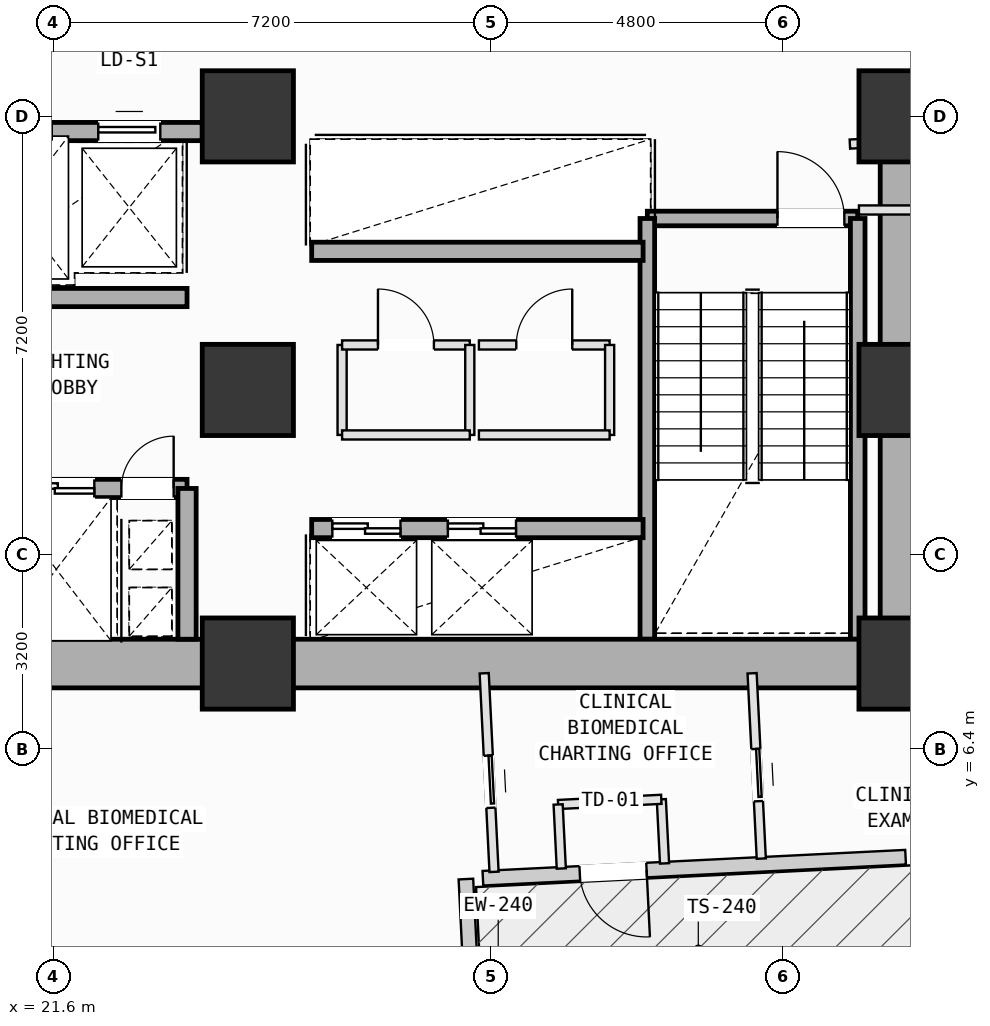
"""IFC4 building model, lengths in metres.
Left out: names, types, materials, properties, quantities, classifications, styles, units other than length and angle.
Written with IfcOpenShell. Run it as: python <this file> out.ifc"""

import sys

from ifc_helpers import new_model, si_unit, direction, frame, frame_2d, origin, origin_2d, place, context, subcontext, project, spatial, rectangle, extrude, element, fill, save


model = new_model("IFC4")
c1 = context("Model", 3, precision=1e-05, world=origin(), true_north=direction((0.0, 1.0)))
c2 = subcontext(c1, "Body", "Model", "MODEL_VIEW")
j1 = project(units=[si_unit("LENGTHUNIT", "METRE"), si_unit("PLANEANGLEUNIT", "RADIAN")], contexts=[c1])
p1 = place(None, origin())
s1 = spatial("IfcSite", under=j1, at=p1, CompositionType="ELEMENT")
p2 = place(p1, origin())
s2 = spatial("IfcBuilding", under=s1, at=p2, CompositionType="ELEMENT")
p3 = place(p2, frame((0.0, 0.0, 35.0)))
s3 = spatial("IfcBuildingStorey", under=s2, at=p3, CompositionType="ELEMENT", Elevation=35.0)
for number, where, z_axis, x_axis in (
    (1, (24.8, 7.8, 0.0), (0.0, 0.0, 1.0), (1.0, 0.0, 0.0)),
    (2, (24.8, 12.3, 0.0), (0.0, 0.0, 1.0), (1.0, 0.0, 0.0)),
    (3, (24.8, 16.8, 0.0), (0.0, 0.0, 1.0), (1.0, 0.0, 0.0)),
    (4, (35.6, 7.8, 0.0), (0.0, 0.0, 1.0), (1.0, 0.0, 0.0)),
    (5, (35.6, 12.3, 0.0), (0.0, 0.0, 1.0), (1.0, 0.0, 0.0)),
    (6, (35.6, 16.8, 0.0), (0.0, 0.0, 1.0), (1.0, 0.0, 0.0)),
):
    element("IfcColumn", number, at=place(p3, frame(where, z_axis=z_axis, x_axis=x_axis)), inside=s3, PredefinedType="COLUMN", context=c2, shape_type="SweptSolid", body=[
        extrude(rectangle(XDim=1.5, YDim=1.5, at=origin_2d()), origin(), (0.0, 0.0, 1.0), 4.0),
    ])
p4 = place(p3, frame((31.91, 2.438, 0.002), z_axis=(0.092332687051, -0.006204172648, 0.995708884737), x_axis=(0.017562948544, 0.999835172037, 0.004601260333)))
e7 = element("IfcColumn", 7, at=p4, inside=s3, PredefinedType="COLUMN", context=c2, shape_type="SweptSolid", body=[
    extrude(rectangle(XDim=1.6, YDim=0.9, at=origin_2d()), origin(), (0.0, 0.0, 1.0), 4.014),
])
p5 = place(p3, frame((35.617, 4.615, 0.0), z_axis=(0.0, 0.0, 1.0), x_axis=(-0.998763945983, -0.04970493139, 0.0)))
e8 = element("IfcWall", 8, at=p5, inside=s3, PredefinedType="SOLIDWALL", context=c2, shape_type="SweptSolid", body=[
    extrude(rectangle(XDim=6.96, YDim=0.24, at=frame_2d((3.48, 0.0))), origin(), (0.0, 0.0, 1.0), 3.165),
])
p6 = place(p5, frame((4.264, 0.0, 0.0)))
e9 = element("IfcOpeningElement", 9, at=p6, cuts=e8, PredefinedType="OPENING", context=c2, shape_type="SweptSolid", body=[
    extrude(rectangle(XDim=1.1, YDim=2.15, at=frame_2d((0.55, 1.075))), frame((0.0, 0.13, 0.0), z_axis=(0.0, -1.0, 0.0), x_axis=(1.0, 0.0, 0.0)), (0.0, 0.0, 1.0), 0.26),
])
p7 = place(p3, frame((28.386, 4.255, 0.0), z_axis=(0.0, 0.0, 1.0), x_axis=(0.049801248091, -0.998759147987, 0.0)))
e10 = element("IfcWall", 10, at=p7, inside=s3, PredefinedType="SOLIDWALL", context=c2, shape_type="SweptSolid", body=[
    extrude(rectangle(XDim=2.5, YDim=0.24, at=frame_2d((1.25, 0.0))), origin(), (0.0, 0.0, 1.0), 3.165),
])
p8 = place(p3, frame((31.37, 15.12, 0.0), z_axis=(0.0, 0.0, 1.0), x_axis=(1.0, 0.0, 0.0)))
e11 = element("IfcWall", 11, at=p8, inside=s3, PredefinedType="SOLIDWALL", context=c2, shape_type="SweptSolid", body=[
    extrude(rectangle(XDim=3.46, YDim=0.24, at=frame_2d((1.73, 0.0))), origin(), (0.0, 0.0, 1.0), 3.78),
])
p9 = place(p8, frame((2.14, 0.0, 0.0)))
e12 = element("IfcOpeningElement", 12, at=p9, cuts=e11, PredefinedType="OPENING", context=c2, shape_type="SweptSolid", body=[
    extrude(rectangle(XDim=1.1, YDim=2.15, at=frame_2d((0.55, 1.075))), frame((0.0, 0.13, 0.0), z_axis=(0.0, -1.0, 0.0), x_axis=(1.0, 0.0, 0.0)), (0.0, 0.0, 1.0), 0.26),
])
for number, where, z_axis, x_axis in (
    (13, (34.83, 15.12, 0.0), (0.0, 0.0, 1.0), (0.0, -1.0, 0.0)),
    (14, (31.37, 8.2, 0.0), (0.0, 0.0, 1.0), (0.0, 1.0, 0.0)),
):
    element("IfcWall", number, at=place(p3, frame(where, z_axis=z_axis, x_axis=x_axis)), inside=s3, PredefinedType="SOLIDWALL", context=c2, shape_type="SweptSolid", body=[
        extrude(rectangle(XDim=6.92, YDim=0.24, at=frame_2d((3.46, 0.0))), origin(), (0.0, 0.0, 1.0), 3.78),
    ])
for number, where, z_axis, x_axis in (
    (15, (14.0, 7.8, 0.0), (0.0, 0.0, 1.0), (1.0, 0.0, 0.0)),
    (16, (24.8, 7.8, 0.0), (0.0, 0.0, 1.0), (1.0, 0.0, 0.0)),
):
    element("IfcWall", number, at=place(p3, frame(where, z_axis=z_axis, x_axis=x_axis)), inside=s3, PredefinedType="SHEAR", context=c2, shape_type="SweptSolid", body=[
        extrude(rectangle(XDim=10.8, YDim=0.8, at=frame_2d((5.4, 0.0))), origin(), (0.0, 0.0, 1.0), 3.78),
    ])
p10 = place(p3, frame((35.6, 7.8, 0.0), z_axis=(0.0, 0.0, 1.0), x_axis=(0.0, 1.0, 0.0)))
e17 = element("IfcWall", 17, at=p10, inside=s3, PredefinedType="SHEAR", context=c2, shape_type="SweptSolid", body=[
    extrude(rectangle(XDim=9.0, YDim=0.8, at=frame_2d((4.5, 0.0))), origin(), (0.0, 0.0, 1.0), 3.78),
])
p11 = place(p3, frame((19.85, 16.55, 0.0), z_axis=(0.0, 0.0, 1.0), x_axis=(1.0, 0.0, 0.0)))
e18 = element("IfcWall", 18, at=p11, inside=s3, PredefinedType="SOLIDWALL", context=c2, shape_type="SweptSolid", body=[
    extrude(rectangle(XDim=4.2, YDim=0.3, at=frame_2d((2.1, 0.0))), origin(), (0.0, 0.0, 1.0), 3.78),
])
p12 = place(p11, frame((0.475, 0.0, 0.0)))
e19 = element("IfcOpeningElement", 19, at=p12, cuts=e18, PredefinedType="OPENING", context=c2, shape_type="SweptSolid", body=[
    extrude(rectangle(XDim=1.25, YDim=2.18, at=frame_2d((0.625, 1.09))), frame((0.0, 0.16, 0.0), z_axis=(0.0, -1.0, 0.0), x_axis=(1.0, 0.0, 0.0)), (0.0, 0.0, 1.0), 0.32),
])
p13 = place(p11, frame((2.49, 0.0, 0.0)))
e20 = element("IfcOpeningElement", 20, at=p13, cuts=e18, PredefinedType="OPENING", context=c2, shape_type="SweptSolid", body=[
    extrude(rectangle(XDim=1.02, YDim=2.12, at=frame_2d((0.51, 1.06))), frame((0.0, 0.16, 0.0), z_axis=(0.0, -1.0, 0.0), x_axis=(1.0, 0.0, 0.0)), (0.0, 0.0, 1.0), 0.32),
])
p14 = place(p3, frame((18.5, 10.68, 0.0), z_axis=(0.0, 0.0, 1.0), x_axis=(1.0, 0.0, 0.0)))
e21 = element("IfcWall", 21, at=p14, inside=s3, PredefinedType="SOLIDWALL", context=c2, shape_type="SweptSolid", body=[
    extrude(rectangle(XDim=5.3, YDim=0.3, at=frame_2d((2.65, 0.0))), origin(), (0.0, 0.0, 1.0), 3.78),
])
p15 = place(p14, frame((4.22, 0.0, 0.0)))
e22 = element("IfcOpeningElement", 22, at=p15, cuts=e21, PredefinedType="OPENING", context=c2, shape_type="SweptSolid", body=[
    extrude(rectangle(XDim=0.86, YDim=2.06, at=frame_2d((0.43, 1.03))), frame((0.0, 0.16, 0.0), z_axis=(0.0, -1.0, 0.0), x_axis=(1.0, 0.0, 0.0)), (0.0, 0.0, 1.0), 0.32),
])
p16 = place(p14, frame((0.425, 0.0, 0.0)))
e23 = element("IfcOpeningElement", 23, at=p16, cuts=e21, PredefinedType="OPENING", context=c2, shape_type="SweptSolid", body=[
    extrude(rectangle(XDim=1.25, YDim=2.18, at=frame_2d((0.625, 1.09))), frame((0.0, 0.16, 0.0), z_axis=(0.0, -1.0, 0.0), x_axis=(1.0, 0.0, 0.0)), (0.0, 0.0, 1.0), 0.32),
])
p17 = place(p14, frame((2.525, 0.0, 0.0)))
e24 = element("IfcOpeningElement", 24, at=p17, cuts=e21, PredefinedType="OPENING", context=c2, shape_type="SweptSolid", body=[
    extrude(rectangle(XDim=1.25, YDim=2.18, at=frame_2d((0.625, 1.09))), frame((0.0, 0.16, 0.0), z_axis=(0.0, -1.0, 0.0), x_axis=(1.0, 0.0, 0.0)), (0.0, 0.0, 1.0), 0.32),
])
p18 = place(p3, frame((18.5, 13.82, 0.0), z_axis=(0.0, 0.0, 1.0), x_axis=(1.0, 0.0, 0.0)))
e25 = element("IfcWall", 25, at=p18, inside=s3, PredefinedType="SOLIDWALL", context=c2, shape_type="SweptSolid", body=[
    extrude(rectangle(XDim=5.3, YDim=0.3, at=frame_2d((2.65, 0.0))), origin(), (0.0, 0.0, 1.0), 3.78),
])
p19 = place(p18, frame((0.18, 0.0, 0.0)))
e26 = element("IfcOpeningElement", 26, at=p19, cuts=e25, PredefinedType="OPENING", context=c2, shape_type="SweptSolid", body=[
    extrude(rectangle(XDim=1.1, YDim=2.15, at=frame_2d((0.55, 1.075))), frame((0.0, 0.16, 0.0), z_axis=(0.0, -1.0, 0.0), x_axis=(1.0, 0.0, 0.0)), (0.0, 0.0, 1.0), 0.32),
])
p20 = place(p3, frame((23.8, 8.2, 0.0), z_axis=(0.0, 0.0, 1.0), x_axis=(0.0, 1.0, 0.0)))
e27 = element("IfcWall", 27, at=p20, inside=s3, PredefinedType="SOLIDWALL", context=c2, shape_type="SweptSolid", body=[
    extrude(rectangle(XDim=2.48, YDim=0.3, at=frame_2d((1.24, 0.0))), origin(), (0.0, 0.0, 1.0), 3.78),
])
p21 = place(p3, frame((25.85, 10.02, 0.0), z_axis=(0.0, 0.0, 1.0), x_axis=(1.0, 0.0, 0.0)))
e28 = element("IfcWall", 28, at=p21, inside=s3, PredefinedType="SOLIDWALL", context=c2, shape_type="SweptSolid", body=[
    extrude(rectangle(XDim=5.45, YDim=0.3, at=frame_2d((2.725, 0.0))), origin(), (0.0, 0.0, 1.0), 3.78),
])
p22 = place(p21, frame((0.34, 0.0, 0.0)))
e29 = element("IfcOpeningElement", 29, at=p22, cuts=e28, PredefinedType="OPENING", context=c2, shape_type="SweptSolid", body=[
    extrude(rectangle(XDim=1.12, YDim=2.15, at=frame_2d((0.56, 1.075))), frame((0.0, 0.16, 0.0), z_axis=(0.0, -1.0, 0.0), x_axis=(1.0, 0.0, 0.0)), (0.0, 0.0, 1.0), 0.32),
])
p23 = place(p21, frame((2.24, 0.0, 0.0)))
e30 = element("IfcOpeningElement", 30, at=p23, cuts=e28, PredefinedType="OPENING", context=c2, shape_type="SweptSolid", body=[
    extrude(rectangle(XDim=1.12, YDim=2.15, at=frame_2d((0.56, 1.075))), frame((0.0, 0.16, 0.0), z_axis=(0.0, -1.0, 0.0), x_axis=(1.0, 0.0, 0.0)), (0.0, 0.0, 1.0), 0.32),
])
p24 = place(p3, frame((25.85, 14.58, 0.0), z_axis=(0.0, 0.0, 1.0), x_axis=(1.0, 0.0, 0.0)))
e31 = element("IfcWall", 31, at=p24, inside=s3, PredefinedType="SOLIDWALL", context=c2, shape_type="SweptSolid", body=[
    extrude(rectangle(XDim=5.45, YDim=0.3, at=frame_2d((2.725, 0.0))), origin(), (0.0, 0.0, 1.0), 3.78),
])
p25 = place(p3, frame((26.35, 11.56, 0.0), z_axis=(0.0, 0.0, 1.0), x_axis=(0.0, 1.0, 0.0)))
e32 = element("IfcWall", 32, at=p25, inside=s3, PredefinedType="PARTITIONING", context=c2, shape_type="SweptSolid", body=[
    extrude(rectangle(XDim=1.48, YDim=0.15, at=frame_2d((0.74, 0.0))), origin(), (0.0, 0.0, 1.0), 3.78),
])
p26 = place(p3, frame((26.35, 13.04, 0.0), z_axis=(0.0, 0.0, 1.0), x_axis=(1.0, 0.0, 0.0)))
e33 = element("IfcWall", 33, at=p26, inside=s3, PredefinedType="PARTITIONING", context=c2, shape_type="SweptSolid", body=[
    extrude(rectangle(XDim=2.1, YDim=0.15, at=frame_2d((1.05, 0.0))), origin(), (0.0, 0.0, 1.0), 3.78),
])
p27 = place(p26, frame((0.59, 0.0, 0.0)))
e34 = element("IfcOpeningElement", 34, at=p27, cuts=e33, PredefinedType="OPENING", context=c2, shape_type="SweptSolid", body=[
    extrude(rectangle(XDim=0.92, YDim=2.1, at=frame_2d((0.46, 1.05))), frame((0.0, 0.085, 0.0), z_axis=(0.0, -1.0, 0.0), x_axis=(1.0, 0.0, 0.0)), (0.0, 0.0, 1.0), 0.17),
])
p28 = place(p3, frame((28.45, 13.04, 0.0), z_axis=(0.0, 0.0, 1.0), x_axis=(0.0, -1.0, 0.0)))
e35 = element("IfcWall", 35, at=p28, inside=s3, PredefinedType="PARTITIONING", context=c2, shape_type="SweptSolid", body=[
    extrude(rectangle(XDim=1.48, YDim=0.15, at=frame_2d((0.74, 0.0))), origin(), (0.0, 0.0, 1.0), 3.78),
])
p29 = place(p3, frame((28.45, 11.56, 0.0), z_axis=(0.0, 0.0, 1.0), x_axis=(-1.0, 0.0, 0.0)))
e36 = element("IfcWall", 36, at=p29, inside=s3, PredefinedType="PARTITIONING", context=c2, shape_type="SweptSolid", body=[
    extrude(rectangle(XDim=2.1, YDim=0.15, at=frame_2d((1.05, 0.0))), origin(), (0.0, 0.0, 1.0), 3.78),
])
p30 = place(p3, frame((28.6, 13.04, 0.0), z_axis=(0.0, 0.0, 1.0), x_axis=(1.0, 0.0, 0.0)))
e37 = element("IfcWall", 37, at=p30, inside=s3, PredefinedType="PARTITIONING", context=c2, shape_type="SweptSolid", body=[
    extrude(rectangle(XDim=2.15, YDim=0.15, at=frame_2d((1.075, 0.0))), origin(), (0.0, 0.0, 1.0), 3.78),
])
p31 = place(p30, frame((0.615, 0.0, 0.0)))
e38 = element("IfcOpeningElement", 38, at=p31, cuts=e37, PredefinedType="OPENING", context=c2, shape_type="SweptSolid", body=[
    extrude(rectangle(XDim=0.92, YDim=2.1, at=frame_2d((0.46, 1.05))), frame((0.0, 0.085, 0.0), z_axis=(0.0, -1.0, 0.0), x_axis=(1.0, 0.0, 0.0)), (0.0, 0.0, 1.0), 0.17),
])
p32 = place(p3, frame((30.75, 13.04, 0.0), z_axis=(0.0, 0.0, 1.0), x_axis=(0.0, -1.0, 0.0)))
e39 = element("IfcWall", 39, at=p32, inside=s3, PredefinedType="PARTITIONING", context=c2, shape_type="SweptSolid", body=[
    extrude(rectangle(XDim=1.48, YDim=0.15, at=frame_2d((0.74, 0.0))), origin(), (0.0, 0.0, 1.0), 3.78),
])
p33 = place(p3, frame((30.75, 11.56, 0.0), z_axis=(0.0, 0.0, 1.0), x_axis=(-1.0, 0.0, 0.0)))
e40 = element("IfcWall", 40, at=p33, inside=s3, PredefinedType="PARTITIONING", context=c2, shape_type="SweptSolid", body=[
    extrude(rectangle(XDim=2.15, YDim=0.15, at=frame_2d((1.075, 0.0))), origin(), (0.0, 0.0, 1.0), 3.78),
])
p34 = place(p3, frame((28.687, 7.64, 0.0), z_axis=(0.0, 0.0, 1.0), x_axis=(0.049576399936, -0.998770334246, 0.0)))
e41 = element("IfcWall", 41, at=p34, inside=s3, PredefinedType="PARTITIONING", context=c2, shape_type="SweptSolid", body=[
    extrude(rectangle(XDim=3.27, YDim=0.15, at=frame_2d((1.635, 0.0))), origin(), (0.0, 0.0, 1.0), 3.78),
])
p35 = place(p34, frame((1.355, 0.0, 0.0)))
e42 = element("IfcOpeningElement", 42, at=p35, cuts=e41, PredefinedType="OPENING", context=c2, shape_type="SweptSolid", body=[
    extrude(rectangle(XDim=0.86, YDim=2.06, at=frame_2d((0.43, 1.03))), frame((0.0, 0.085, 0.0), z_axis=(0.0, -1.0, 0.0), x_axis=(1.0, 0.0, 0.0)), (0.0, 0.0, 1.0), 0.17),
])
p36 = place(p3, frame((33.093, 7.64, 0.0), z_axis=(0.0, 0.0, 1.0), x_axis=(0.049442819508, -0.998776955881, 0.0)))
e43 = element("IfcWall", 43, at=p36, inside=s3, PredefinedType="PARTITIONING", context=c2, shape_type="SweptSolid", body=[
    extrude(rectangle(XDim=3.052, YDim=0.15, at=frame_2d((1.526, 0.0))), origin(), (0.0, 0.0, 1.0), 3.78),
])
p37 = place(p36, frame((1.246, 0.0, 0.0)))
e44 = element("IfcOpeningElement", 44, at=p37, cuts=e43, PredefinedType="OPENING", context=c2, shape_type="SweptSolid", body=[
    extrude(rectangle(XDim=0.86, YDim=2.06, at=frame_2d((0.43, 1.03))), frame((0.0, 0.085, 0.0), z_axis=(0.0, -1.0, 0.0), x_axis=(1.0, 0.0, 0.0)), (0.0, 0.0, 1.0), 0.17),
])
p38 = place(p3, frame((31.653, 4.513, 0.0), z_axis=(0.0, 0.0, 1.0), x_axis=(-0.050203004496, 0.998739034152, 0.0)))
e45 = element("IfcWall", 45, at=p38, inside=s3, PredefinedType="PARTITIONING", context=c2, shape_type="SweptSolid", body=[
    extrude(rectangle(XDim=1.055, YDim=0.15, at=frame_2d((0.528, 0.0))), origin(), (0.0, 0.0, 1.0), 3.78),
])
p39 = place(p3, frame((31.6, 5.567, 0.0), z_axis=(0.0, 0.0, 1.0), x_axis=(-0.998749111962, -0.050002113503, 0.0)))
e46 = element("IfcWall", 46, at=p39, inside=s3, PredefinedType="PARTITIONING", context=c2, shape_type="SweptSolid", body=[
    extrude(rectangle(XDim=1.699, YDim=0.15, at=frame_2d((0.85, 0.0))), origin(), (0.0, 0.0, 1.0), 3.78),
])
p40 = place(p3, frame((29.903, 5.482, 0.0), z_axis=(0.0, 0.0, 1.0), x_axis=(0.049325464305, -0.998782758447, 0.0)))
e47 = element("IfcWall", 47, at=p40, inside=s3, PredefinedType="PARTITIONING", context=c2, shape_type="SweptSolid", body=[
    extrude(rectangle(XDim=1.054, YDim=0.15, at=frame_2d((0.527, 0.0))), origin(), (0.0, 0.0, 1.0), 3.78),
])
p41 = place(p3, frame((35.6, 7.5, 0.0), z_axis=(0.0, 0.0, 1.0), x_axis=(1.0, 0.0, 0.0)))
e48 = element("IfcWall", 48, at=p41, inside=s3, PredefinedType="PARTITIONING", context=c2, shape_type="SweptSolid", body=[
    extrude(rectangle(XDim=0.55, YDim=0.15, at=frame_2d((0.275, 0.0))), origin(), (0.0, 0.0, 1.0), 2.865),
])
p42 = place(p3, frame((36.15, 15.26, 0.0), z_axis=(0.0, 0.0, 1.0), x_axis=(-1.0, 0.0, 0.0)))
e49 = element("IfcWall", 49, at=p42, inside=s3, PredefinedType="PARTITIONING", context=c2, shape_type="SweptSolid", body=[
    extrude(rectangle(XDim=1.3, YDim=0.15, at=frame_2d((0.65, 0.0))), origin(), (0.0, 0.0, 1.0), 3.78),
])
p43 = place(p3, frame((34.701, 16.344, 0.0), z_axis=(0.0, 0.0, 1.0), x_axis=(0.998749368523, 0.049996988651, 0.0)))
e50 = element("IfcWall", 50, at=p43, inside=s3, PredefinedType="PARTITIONING", context=c2, shape_type="SweptSolid", body=[
    extrude(rectangle(XDim=2.461, YDim=0.15, at=frame_2d((1.23, 0.0))), origin(), (0.0, 0.0, 1.0), 2.865),
])
p44 = place(p6, origin())
e51 = element("IfcDoor", 51, at=p44, inside=s3, OperationType="SINGLE_SWING_LEFT", PredefinedType="DOOR", context=c2, shape_type="SweptSolid", body=[
    extrude(rectangle(XDim=1.1, YDim=2.15, at=frame_2d((0.55, 1.075))), frame((0.0, 0.025, 0.0), z_axis=(0.0, -1.0, 0.0), x_axis=(1.0, 0.0, 0.0)), (0.0, 0.0, 1.0), 0.05),
])
fill(e9, e51)
p45 = place(p9, origin())
e52 = element("IfcDoor", 52, at=p45, inside=s3, OperationType="SINGLE_SWING_LEFT", PredefinedType="DOOR", context=c2, shape_type="SweptSolid", body=[
    extrude(rectangle(XDim=1.1, YDim=2.15, at=frame_2d((0.55, 1.075))), frame((0.0, 0.025, 0.0), z_axis=(0.0, -1.0, 0.0), x_axis=(1.0, 0.0, 0.0)), (0.0, 0.0, 1.0), 0.05),
])
fill(e12, e52)
p46 = place(p15, origin())
e53 = element("IfcDoor", 53, at=p46, inside=s3, OperationType="SINGLE_SWING_RIGHT", PredefinedType="DOOR", context=c2, shape_type="SweptSolid", body=[
    extrude(rectangle(XDim=0.86, YDim=2.06, at=frame_2d((0.43, 1.03))), frame((0.0, 0.025, 0.0), z_axis=(0.0, -1.0, 0.0), x_axis=(1.0, 0.0, 0.0)), (0.0, 0.0, 1.0), 0.05),
])
fill(e22, e53)
p47 = place(p17, origin())
e54 = element("IfcDoor", 54, at=p47, inside=s3, OperationType="DOUBLE_DOOR_SLIDING", PredefinedType="DOOR", context=c2, shape_type="SweptSolid", body=[
    extrude(rectangle(XDim=1.25, YDim=2.18, at=frame_2d((0.625, 1.09))), frame((0.0, 0.025, 0.0), z_axis=(0.0, -1.0, 0.0), x_axis=(1.0, 0.0, 0.0)), (0.0, 0.0, 1.0), 0.05),
])
fill(e24, e54)
p48 = place(p22, origin())
e55 = element("IfcDoor", 55, at=p48, inside=s3, OperationType="DOUBLE_DOOR_SLIDING", PredefinedType="DOOR", context=c2, shape_type="SweptSolid", body=[
    extrude(rectangle(XDim=1.12, YDim=2.15, at=frame_2d((0.56, 1.075))), frame((0.0, 0.025, 0.0), z_axis=(0.0, -1.0, 0.0), x_axis=(1.0, 0.0, 0.0)), (0.0, 0.0, 1.0), 0.05),
])
fill(e29, e55)
p49 = place(p23, origin())
e56 = element("IfcDoor", 56, at=p49, inside=s3, OperationType="DOUBLE_DOOR_SLIDING", PredefinedType="DOOR", context=c2, shape_type="SweptSolid", body=[
    extrude(rectangle(XDim=1.12, YDim=2.15, at=frame_2d((0.56, 1.075))), frame((0.0, 0.025, 0.0), z_axis=(0.0, -1.0, 0.0), x_axis=(1.0, 0.0, 0.0)), (0.0, 0.0, 1.0), 0.05),
])
fill(e30, e56)
p50 = place(p13, origin())
e57 = element("IfcDoor", 57, at=p50, inside=s3, OperationType="SLIDING_TO_LEFT", PredefinedType="DOOR", context=c2, shape_type="SweptSolid", body=[
    extrude(rectangle(XDim=1.02, YDim=2.12, at=frame_2d((0.51, 1.06))), frame((0.0, 0.025, 0.0), z_axis=(0.0, -1.0, 0.0), x_axis=(1.0, 0.0, 0.0)), (0.0, 0.0, 1.0), 0.05),
])
fill(e20, e57)
p51 = place(p27, origin())
e58 = element("IfcDoor", 58, at=p51, inside=s3, OperationType="SINGLE_SWING_LEFT", PredefinedType="DOOR", context=c2, shape_type="SweptSolid", body=[
    extrude(rectangle(XDim=0.92, YDim=2.1, at=frame_2d((0.46, 1.05))), frame((0.0, 0.025, 0.0), z_axis=(0.0, -1.0, 0.0), x_axis=(1.0, 0.0, 0.0)), (0.0, 0.0, 1.0), 0.05),
])
fill(e34, e58)
p52 = place(p31, origin())
e59 = element("IfcDoor", 59, at=p52, inside=s3, OperationType="SINGLE_SWING_RIGHT", PredefinedType="DOOR", context=c2, shape_type="SweptSolid", body=[
    extrude(rectangle(XDim=0.92, YDim=2.1, at=frame_2d((0.46, 1.05))), frame((0.0, 0.025, 0.0), z_axis=(0.0, -1.0, 0.0), x_axis=(1.0, 0.0, 0.0)), (0.0, 0.0, 1.0), 0.05),
])
fill(e38, e59)
p53 = place(p37, origin())
e60 = element("IfcDoor", 60, at=p53, inside=s3, OperationType="SLIDING_TO_LEFT", PredefinedType="DOOR", context=c2, shape_type="SweptSolid", body=[
    extrude(rectangle(XDim=0.86, YDim=2.06, at=frame_2d((0.43, 1.03))), frame((0.0, 0.025, 0.0), z_axis=(0.0, -1.0, 0.0), x_axis=(1.0, 0.0, 0.0)), (0.0, 0.0, 1.0), 0.05),
])
fill(e44, e60)
p54 = place(p35, origin())
e61 = element("IfcDoor", 61, at=p54, inside=s3, OperationType="SLIDING_TO_LEFT", PredefinedType="DOOR", context=c2, shape_type="SweptSolid", body=[
    extrude(rectangle(XDim=0.86, YDim=2.06, at=frame_2d((0.43, 1.03))), frame((0.0, 0.025, 0.0), z_axis=(0.0, -1.0, 0.0), x_axis=(1.0, 0.0, 0.0)), (0.0, 0.0, 1.0), 0.05),
])
fill(e42, e61)
save(model, sys.argv[1])
